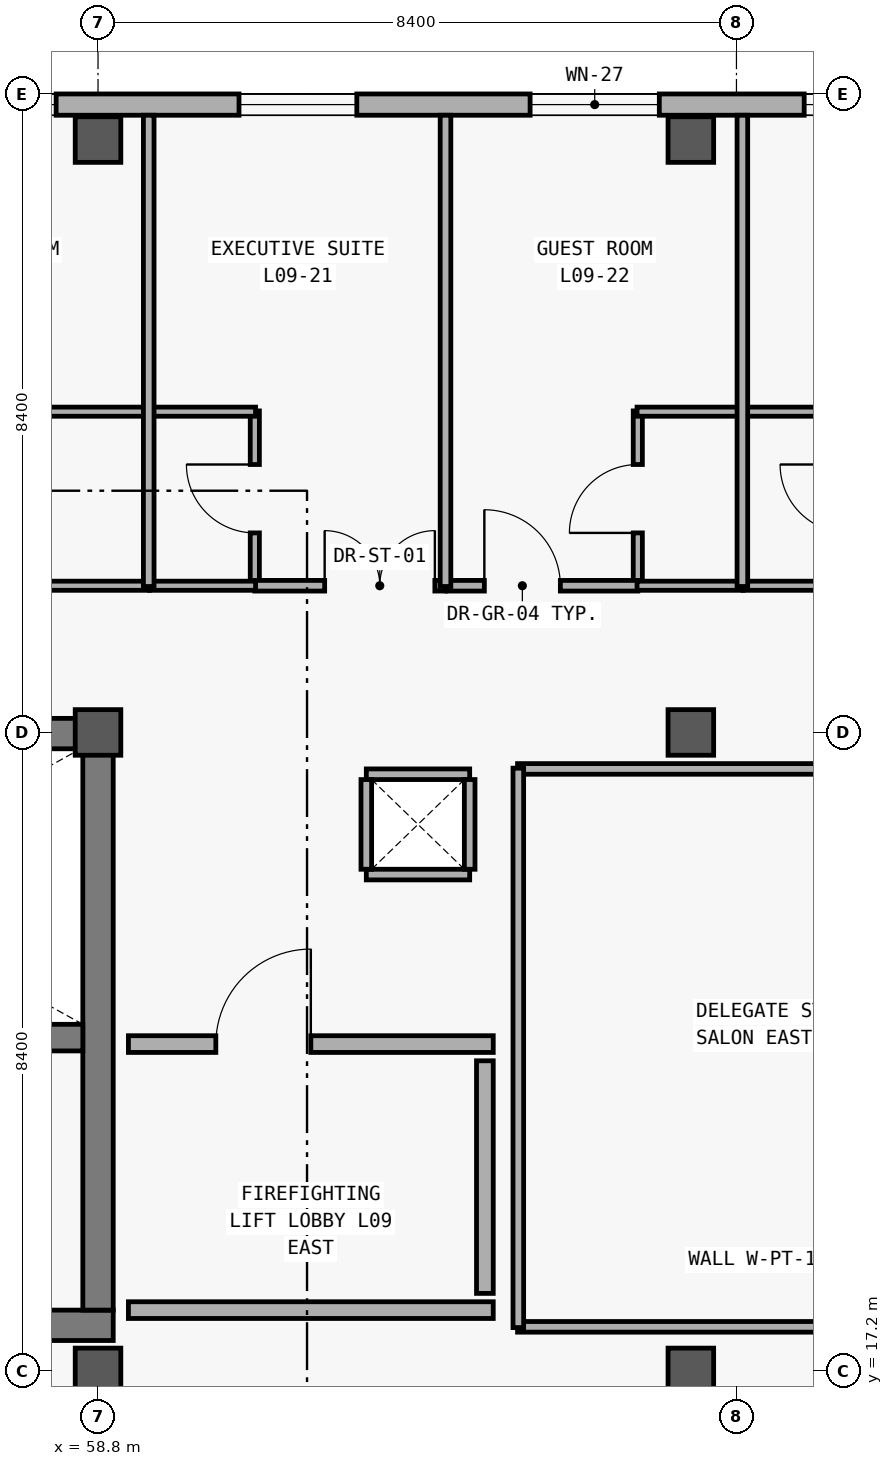
"""IFC4 building model, lengths in metres.
Left out: names, types, materials, properties, quantities, classifications, styles, units other than length and angle.
Written with IfcOpenShell. Run it as: python <this file> out.ifc"""

import sys

from ifc_helpers import new_model, si_unit, direction, frame, frame_2d, origin, origin_2d, place, context, subcontext, project, spatial, rectangle, extrude, element, fill, save


model = new_model("IFC4")
c1 = context("Model", 3, precision=1e-05, world=origin(), true_north=direction((0.0, 1.0)))
c2 = subcontext(c1, "Body", "Model", "MODEL_VIEW")
j1 = project(units=[si_unit("LENGTHUNIT", "METRE"), si_unit("PLANEANGLEUNIT", "RADIAN")], contexts=[c1])
p1 = place(None, origin())
s1 = spatial("IfcSite", under=j1, at=p1, CompositionType="ELEMENT")
p2 = place(p1, origin())
s2 = spatial("IfcBuilding", under=s1, at=p2, CompositionType="ELEMENT")
p3 = place(p2, frame((0.0, 0.0, 37.2)))
s3 = spatial("IfcBuildingStorey", under=s2, at=p3, CompositionType="ELEMENT", Elevation=37.2)
for number, where, z_axis, x_axis in (
    (1, (58.8, 17.2, 0.0), (0.0, 0.0, 1.0), (1.0, 0.0, 0.0)),
    (2, (58.8, 25.6, 0.0), (0.0, 0.0, 1.0), (1.0, 0.0, 0.0)),
    (3, (58.8, 33.4, 0.0), (0.0, 0.0, 1.0), (1.0, 0.0, 0.0)),
    (4, (66.6, 17.2, 0.0), (0.0, 0.0, 1.0), (1.0, 0.0, 0.0)),
    (5, (66.6, 25.6, 0.0), (0.0, 0.0, 1.0), (1.0, 0.0, 0.0)),
    (6, (66.6, 33.4, 0.0), (0.0, 0.0, 1.0), (1.0, 0.0, 0.0)),
):
    element("IfcColumn", number, at=place(p3, frame(where, z_axis=z_axis, x_axis=x_axis)), inside=s3, PredefinedType="COLUMN", context=c2, shape_type="SweptSolid", body=[
        extrude(rectangle(XDim=0.6, YDim=0.6, at=origin_2d()), origin(), (0.0, 0.0, 1.0), 3.6),
    ])
p4 = place(p3, frame((17.08, 33.86, 0.0), z_axis=(0.0, 0.0, 1.0), x_axis=(1.0, 0.0, 0.0)))
e7 = element("IfcWall", 7, at=p4, inside=s3, PredefinedType="SOLIDWALL", context=c2, shape_type="SweptSolid", body=[
    extrude(rectangle(XDim=58.24, YDim=0.28, at=frame_2d((29.12, 0.0))), origin(), (0.0, 0.0, 1.0), 3.34),
])
p5 = place(p4, frame((4.87, 0.0, 0.85)))
e8 = element("IfcOpeningElement", 8, at=p5, cuts=e7, PredefinedType="OPENING", context=c2, shape_type="SweptSolid", body=[
    extrude(rectangle(XDim=1.55, YDim=1.65, at=frame_2d((0.775, 0.825))), frame((0.0, 0.15, 0.0), z_axis=(0.0, -1.0, 0.0), x_axis=(1.0, 0.0, 0.0)), (0.0, 0.0, 1.0), 0.3),
])
p6 = place(p4, frame((12.303, 0.0, 0.85)))
e9 = element("IfcOpeningElement", 9, at=p6, cuts=e7, PredefinedType="OPENING", context=c2, shape_type="SweptSolid", body=[
    extrude(rectangle(XDim=1.6, YDim=1.6, at=frame_2d((0.8, 0.8))), frame((0.0, 0.15, 0.0), z_axis=(0.0, -1.0, 0.0), x_axis=(1.0, 0.0, 0.0)), (0.0, 0.0, 1.0), 0.3),
])
p7 = place(p4, frame((16.109, 0.0, 0.85)))
e10 = element("IfcOpeningElement", 10, at=p7, cuts=e7, PredefinedType="OPENING", context=c2, shape_type="SweptSolid", body=[
    extrude(rectangle(XDim=1.8, YDim=1.6, at=frame_2d((0.9, 0.8))), frame((0.0, 0.15, 0.0), z_axis=(0.0, -1.0, 0.0), x_axis=(1.0, 0.0, 0.0)), (0.0, 0.0, 1.0), 0.3),
])
p8 = place(p4, frame((19.915, 0.0, 0.85)))
e11 = element("IfcOpeningElement", 11, at=p8, cuts=e7, PredefinedType="OPENING", context=c2, shape_type="SweptSolid", body=[
    extrude(rectangle(XDim=2.0, YDim=1.65, at=frame_2d((1.0, 0.825))), frame((0.0, 0.15, 0.0), z_axis=(0.0, -1.0, 0.0), x_axis=(1.0, 0.0, 0.0)), (0.0, 0.0, 1.0), 0.3),
])
p9 = place(p4, frame((23.72, 0.0, 0.85)))
e12 = element("IfcOpeningElement", 12, at=p9, cuts=e7, PredefinedType="OPENING", context=c2, shape_type="SweptSolid", body=[
    extrude(rectangle(XDim=2.2, YDim=1.65, at=frame_2d((1.1, 0.825))), frame((0.0, 0.15, 0.0), z_axis=(0.0, -1.0, 0.0), x_axis=(1.0, 0.0, 0.0)), (0.0, 0.0, 1.0), 0.3),
])
p10 = place(p4, frame((27.426, 0.0, 0.85)))
e13 = element("IfcOpeningElement", 13, at=p10, cuts=e7, PredefinedType="OPENING", context=c2, shape_type="SweptSolid", body=[
    extrude(rectangle(XDim=2.6, YDim=2.2, at=frame_2d((1.3, 1.1))), frame((0.0, 0.15, 0.0), z_axis=(0.0, -1.0, 0.0), x_axis=(1.0, 0.0, 0.0)), (0.0, 0.0, 1.0), 0.3),
])
p11 = place(p4, frame((32.007, 0.0, 0.85)))
e14 = element("IfcOpeningElement", 14, at=p11, cuts=e7, PredefinedType="OPENING", context=c2, shape_type="SweptSolid", body=[
    extrude(rectangle(XDim=1.25, YDim=1.45, at=frame_2d((0.625, 0.725))), frame((0.0, 0.15, 0.0), z_axis=(0.0, -1.0, 0.0), x_axis=(1.0, 0.0, 0.0)), (0.0, 0.0, 1.0), 0.3),
])
p12 = place(p4, frame((35.863, 0.0, 0.85)))
e15 = element("IfcOpeningElement", 15, at=p12, cuts=e7, PredefinedType="OPENING", context=c2, shape_type="SweptSolid", body=[
    extrude(rectangle(XDim=1.35, YDim=1.55, at=frame_2d((0.675, 0.775))), frame((0.0, 0.15, 0.0), z_axis=(0.0, -1.0, 0.0), x_axis=(1.0, 0.0, 0.0)), (0.0, 0.0, 1.0), 0.3),
])
p13 = place(p4, frame((39.719, 0.0, 0.85)))
e16 = element("IfcOpeningElement", 16, at=p13, cuts=e7, PredefinedType="OPENING", context=c2, shape_type="SweptSolid", body=[
    extrude(rectangle(XDim=1.45, YDim=1.65, at=frame_2d((0.725, 0.825))), frame((0.0, 0.15, 0.0), z_axis=(0.0, -1.0, 0.0), x_axis=(1.0, 0.0, 0.0)), (0.0, 0.0, 1.0), 0.3),
])
p14 = place(p4, frame((43.575, 0.0, 0.85)))
e17 = element("IfcOpeningElement", 17, at=p14, cuts=e7, PredefinedType="OPENING", context=c2, shape_type="SweptSolid", body=[
    extrude(rectangle(XDim=1.55, YDim=1.65, at=frame_2d((0.775, 0.825))), frame((0.0, 0.15, 0.0), z_axis=(0.0, -1.0, 0.0), x_axis=(1.0, 0.0, 0.0)), (0.0, 0.0, 1.0), 0.3),
])
p15 = place(p4, frame((47.405, 0.0, 0.85)))
e18 = element("IfcOpeningElement", 18, at=p15, cuts=e7, PredefinedType="OPENING", context=c2, shape_type="SweptSolid", body=[
    extrude(rectangle(XDim=1.7, YDim=2.0, at=frame_2d((0.85, 1.0))), frame((0.0, 0.15, 0.0), z_axis=(0.0, -1.0, 0.0), x_axis=(1.0, 0.0, 0.0)), (0.0, 0.0, 1.0), 0.3),
])
p16 = place(p4, frame((51.011, 0.0, 0.85)))
e19 = element("IfcOpeningElement", 19, at=p16, cuts=e7, PredefinedType="OPENING", context=c2, shape_type="SweptSolid", body=[
    extrude(rectangle(XDim=2.3, YDim=2.05, at=frame_2d((1.15, 1.025))), frame((0.0, 0.15, 0.0), z_axis=(0.0, -1.0, 0.0), x_axis=(1.0, 0.0, 0.0)), (0.0, 0.0, 1.0), 0.3),
])
p17 = place(p4, frame((54.692, 0.0, 0.85)))
e20 = element("IfcOpeningElement", 20, at=p17, cuts=e7, PredefinedType="OPENING", context=c2, shape_type="SweptSolid", body=[
    extrude(rectangle(XDim=2.75, YDim=2.1, at=frame_2d((1.375, 1.05))), frame((0.0, 0.15, 0.0), z_axis=(0.0, -1.0, 0.0), x_axis=(1.0, 0.0, 0.0)), (0.0, 0.0, 1.0), 0.3),
])
p18 = place(p3, frame((49.8, 17.8, 0.0), z_axis=(0.0, 0.0, 1.0), x_axis=(1.0, 0.0, 0.0)))
e21 = element("IfcWall", 21, at=p18, inside=s3, PredefinedType="SHEAR", context=c2, shape_type="SweptSolid", body=[
    extrude(rectangle(XDim=9.2, YDim=0.4, at=frame_2d((4.6, 0.0))), origin(), (0.0, 0.0, 1.0), 3.32),
])
p19 = place(p18, frame((1.1, 0.0, 0.0)))
e22 = element("IfcOpeningElement", 22, at=p19, cuts=e21, PredefinedType="OPENING", context=c2, shape_type="SweptSolid", body=[
    extrude(rectangle(XDim=1.2, YDim=2.2, at=frame_2d((0.6, 1.1))), frame((0.0, 0.21, 0.0), z_axis=(0.0, -1.0, 0.0), x_axis=(1.0, 0.0, 0.0)), (0.0, 0.0, 1.0), 0.42),
])
p20 = place(p18, frame((3.5, 0.0, 0.0)))
e23 = element("IfcOpeningElement", 23, at=p20, cuts=e21, PredefinedType="OPENING", context=c2, shape_type="SweptSolid", body=[
    extrude(rectangle(XDim=1.1, YDim=2.2, at=frame_2d((0.55, 1.1))), frame((0.0, 0.21, 0.0), z_axis=(0.0, -1.0, 0.0), x_axis=(1.0, 0.0, 0.0)), (0.0, 0.0, 1.0), 0.42),
])
p21 = place(p18, frame((5.9, 0.0, 0.0)))
e24 = element("IfcOpeningElement", 24, at=p21, cuts=e21, PredefinedType="OPENING", context=c2, shape_type="SweptSolid", body=[
    extrude(rectangle(XDim=1.3, YDim=2.3, at=frame_2d((0.65, 1.15))), frame((0.0, 0.21, 0.0), z_axis=(0.0, -1.0, 0.0), x_axis=(1.0, 0.0, 0.0)), (0.0, 0.0, 1.0), 0.42),
])
p22 = place(p3, frame((59.0, 25.585, 0.0), z_axis=(0.0, 0.0, 1.0), x_axis=(-1.0, 0.0, 0.0)))
e25 = element("IfcWall", 25, at=p22, inside=s3, PredefinedType="SHEAR", context=c2, shape_type="SweptSolid", body=[
    extrude(rectangle(XDim=9.2, YDim=0.4, at=frame_2d((4.6, 0.0))), origin(), (0.0, 0.0, 1.0), 3.32),
])
p23 = place(p3, frame((58.8, 18.0, 0.0), z_axis=(0.0, 0.0, 1.0), x_axis=(0.0, 1.0, 0.0)))
e26 = element("IfcWall", 26, at=p23, inside=s3, PredefinedType="SHEAR", context=c2, shape_type="SweptSolid", body=[
    extrude(rectangle(XDim=7.4, YDim=0.4, at=frame_2d((3.7, 0.0))), origin(), (0.0, 0.0, 1.0), 3.32),
])
p24 = place(p3, frame((50.2, 21.585, 0.0), z_axis=(0.0, 0.0, 1.0), x_axis=(1.0, 0.0, 0.0)))
e27 = element("IfcWall", 27, at=p24, inside=s3, PredefinedType="SHEAR", context=c2, shape_type="SweptSolid", body=[
    extrude(rectangle(XDim=8.4, YDim=0.35, at=frame_2d((4.2, 0.0))), origin(), (0.0, 0.0, 1.0), 3.32),
])
p25 = place(p3, frame((59.2, 18.0, 0.0), z_axis=(0.0, 0.0, 1.0), x_axis=(1.0, 0.0, 0.0)))
e28 = element("IfcWall", 28, at=p25, inside=s3, PredefinedType="SOLIDWALL", context=c2, shape_type="SweptSolid", body=[
    extrude(rectangle(XDim=4.8, YDim=0.22, at=frame_2d((2.4, 0.0))), origin(), (0.0, 0.0, 1.0), 2.47),
])
p26 = place(p3, frame((59.2, 21.5, 0.0), z_axis=(0.0, 0.0, 1.0), x_axis=(1.0, 0.0, 0.0)))
e29 = element("IfcWall", 29, at=p26, inside=s3, PredefinedType="SOLIDWALL", context=c2, shape_type="SweptSolid", body=[
    extrude(rectangle(XDim=4.8, YDim=0.22, at=frame_2d((2.4, 0.0))), origin(), (0.0, 0.0, 1.0), 2.47),
])
p27 = place(p26, frame((1.15, 0.0, 0.0)))
e30 = element("IfcOpeningElement", 30, at=p27, cuts=e29, PredefinedType="OPENING", context=c2, shape_type="SweptSolid", body=[
    extrude(rectangle(XDim=1.25, YDim=2.2, at=frame_2d((0.625, 1.1))), frame((0.0, 0.12, 0.0), z_axis=(0.0, -1.0, 0.0), x_axis=(1.0, 0.0, 0.0)), (0.0, 0.0, 1.0), 0.24),
])
p28 = place(p3, frame((63.89, 18.22, 0.0), z_axis=(0.0, 0.0, 1.0), x_axis=(0.0, 1.0, 0.0)))
e31 = element("IfcWall", 31, at=p28, inside=s3, PredefinedType="SOLIDWALL", context=c2, shape_type="SweptSolid", body=[
    extrude(rectangle(XDim=3.06, YDim=0.22, at=frame_2d((1.53, 0.0))), origin(), (0.0, 0.0, 1.0), 2.47),
])
p29 = place(p3, frame((60.863, 27.52, 0.0), z_axis=(0.0, 0.0, 1.0), x_axis=(0.0, 1.0, 0.0)))
e32 = element("IfcWall", 32, at=p29, inside=s3, PredefinedType="PARTITIONING", context=c2, shape_type="SweptSolid", body=[
    extrude(rectangle(XDim=2.31, YDim=0.12, at=frame_2d((1.155, 0.0))), origin(), (0.0, 0.0, 1.0), 2.48),
])
p30 = place(p29, frame((0.705, 0.0, 0.0)))
e33 = element("IfcOpeningElement", 33, at=p30, cuts=e32, PredefinedType="OPENING", context=c2, shape_type="SweptSolid", body=[
    extrude(rectangle(XDim=0.9, YDim=2.18, at=frame_2d((0.45, 1.09))), frame((0.0, 0.07, 0.0), z_axis=(0.0, -1.0, 0.0), x_axis=(1.0, 0.0, 0.0)), (0.0, 0.0, 1.0), 0.14),
])
p31 = place(p3, frame((65.902, 27.52, 0.0), z_axis=(0.0, 0.0, 1.0), x_axis=(0.0, 1.0, 0.0)))
e34 = element("IfcWall", 34, at=p31, inside=s3, PredefinedType="PARTITIONING", context=c2, shape_type="SweptSolid", body=[
    extrude(rectangle(XDim=2.31, YDim=0.12, at=frame_2d((1.155, 0.0))), origin(), (0.0, 0.0, 1.0), 2.48),
])
p32 = place(p31, frame((0.705, 0.0, 0.0)))
e35 = element("IfcOpeningElement", 35, at=p32, cuts=e34, PredefinedType="OPENING", context=c2, shape_type="SweptSolid", body=[
    extrude(rectangle(XDim=0.9, YDim=2.18, at=frame_2d((0.45, 1.09))), frame((0.0, 0.07, 0.0), z_axis=(0.0, -1.0, 0.0), x_axis=(1.0, 0.0, 0.0)), (0.0, 0.0, 1.0), 0.14),
])
p33 = place(p3, frame((64.32, 17.78, 0.0), z_axis=(0.0, 0.0, 1.0), x_axis=(1.0, 0.0, 0.0)))
e36 = element("IfcWall", 36, at=p33, inside=s3, PredefinedType="PARTITIONING", context=c2, shape_type="SweptSolid", body=[
    extrude(rectangle(XDim=11.0, YDim=0.14, at=frame_2d((5.5, 0.0))), origin(), (0.0, 0.0, 1.0), 2.48),
])
p34 = place(p33, frame((5.958, 0.0, 0.0)))
e37 = element("IfcOpeningElement", 37, at=p34, cuts=e36, PredefinedType="OPENING", context=c2, shape_type="SweptSolid", body=[
    extrude(rectangle(XDim=1.08, YDim=2.25, at=frame_2d((0.54, 1.125))), frame((0.0, 0.08, 0.0), z_axis=(0.0, -1.0, 0.0), x_axis=(1.0, 0.0, 0.0)), (0.0, 0.0, 1.0), 0.16),
])
p35 = place(p3, frame((60.863, 27.53, 0.0), z_axis=(0.0, 0.0, 1.0), x_axis=(1.0, 0.0, 0.0)))
e38 = element("IfcWall", 38, at=p35, inside=s3, PredefinedType="PARTITIONING", context=c2, shape_type="SweptSolid", body=[
    extrude(rectangle(XDim=2.509, YDim=0.14, at=frame_2d((1.254, 0.0))), origin(), (0.0, 0.0, 1.0), 2.48),
])
p36 = place(p35, frame((0.919, 0.0, 0.0)))
e39 = element("IfcOpeningElement", 39, at=p36, cuts=e38, PredefinedType="OPENING", context=c2, shape_type="SweptSolid", body=[
    extrude(rectangle(XDim=1.45, YDim=2.3, at=frame_2d((0.725, 1.15))), frame((0.0, 0.08, 0.0), z_axis=(0.0, -1.0, 0.0), x_axis=(1.0, 0.0, 0.0)), (0.0, 0.0, 1.0), 0.16),
])
p37 = place(p3, frame((63.392, 27.53, 0.0), z_axis=(0.0, 0.0, 1.0), x_axis=(1.0, 0.0, 0.0)))
e40 = element("IfcWall", 40, at=p37, inside=s3, PredefinedType="PARTITIONING", context=c2, shape_type="SweptSolid", body=[
    extrude(rectangle(XDim=2.51, YDim=0.14, at=frame_2d((1.255, 0.0))), origin(), (0.0, 0.0, 1.0), 2.48),
])
p38 = place(p37, frame((0.491, 0.0, 0.0)))
e41 = element("IfcOpeningElement", 41, at=p38, cuts=e40, PredefinedType="OPENING", context=c2, shape_type="SweptSolid", body=[
    extrude(rectangle(XDim=1.0, YDim=2.28, at=frame_2d((0.5, 1.14))), frame((0.0, 0.08, 0.0), z_axis=(0.0, -1.0, 0.0), x_axis=(1.0, 0.0, 0.0)), (0.0, 0.0, 1.0), 0.16),
])
for number, where, z_axis, x_axis in (
    (42, (58.081, 27.53, 0.0), (0.0, 0.0, 1.0), (1.0, 0.0, 0.0)),
    (43, (58.081, 29.82, 0.0), (0.0, 0.0, 1.0), (1.0, 0.0, 0.0)),
    (44, (59.477, 27.53, 0.0), (0.0, 0.0, 1.0), (1.0, 0.0, 0.0)),
    (45, (59.477, 29.82, 0.0), (0.0, 0.0, 1.0), (1.0, 0.0, 0.0)),
    (46, (65.892, 27.53, 0.0), (0.0, 0.0, 1.0), (1.0, 0.0, 0.0)),
    (47, (65.892, 29.82, 0.0), (0.0, 0.0, 1.0), (1.0, 0.0, 0.0)),
    (48, (67.288, 27.53, 0.0), (0.0, 0.0, 1.0), (1.0, 0.0, 0.0)),
    (49, (67.288, 29.82, 0.0), (0.0, 0.0, 1.0), (1.0, 0.0, 0.0)),
):
    element("IfcWall", number, at=place(p3, frame(where, z_axis=z_axis, x_axis=x_axis)), inside=s3, PredefinedType="PARTITIONING", context=c2, shape_type="SweptSolid", body=[
        extrude(rectangle(XDim=1.396, YDim=0.12, at=frame_2d((0.698, 0.0))), origin(), (0.0, 0.0, 1.0), 2.48),
    ])
p39 = place(p3, frame((64.32, 25.12, 0.0), z_axis=(0.0, 0.0, 1.0), x_axis=(1.0, 0.0, 0.0)))
e50 = element("IfcWall", 50, at=p39, inside=s3, PredefinedType="PARTITIONING", context=c2, shape_type="SweptSolid", body=[
    extrude(rectangle(XDim=11.0, YDim=0.14, at=frame_2d((5.5, 0.0))), origin(), (0.0, 0.0, 1.0), 2.48),
])
p40 = place(p3, frame((64.33, 17.77, 0.0), z_axis=(0.0, 0.0, 1.0), x_axis=(0.0, 1.0, 0.0)))
e51 = element("IfcWall", 51, at=p40, inside=s3, PredefinedType="PARTITIONING", context=c2, shape_type="SweptSolid", body=[
    extrude(rectangle(XDim=7.36, YDim=0.14, at=frame_2d((3.68, 0.0))), origin(), (0.0, 0.0, 1.0), 2.48),
])
for number, where, z_axis, x_axis in (
    (52, (59.467, 27.52, 0.0), (0.0, 0.0, 1.0), (0.0, 1.0, 0.0)),
    (53, (63.372, 27.52, 0.0), (0.0, 0.0, 1.0), (0.0, 1.0, 0.0)),
    (54, (67.278, 27.52, 0.0), (0.0, 0.0, 1.0), (0.0, 1.0, 0.0)),
):
    element("IfcWall", number, at=place(p3, frame(where, z_axis=z_axis, x_axis=x_axis)), inside=s3, PredefinedType="PARTITIONING", context=c2, shape_type="SweptSolid", body=[
        extrude(rectangle(XDim=6.2, YDim=0.14, at=frame_2d((3.1, 0.0))), origin(), (0.0, 0.0, 1.0), 2.48),
    ])
for number, where, z_axis, x_axis in (
    (55, (62.33, 23.73, 0.0), (0.0, 0.0, 1.0), (1.0, 0.0, 0.0)),
    (56, (63.69, 25.05, 0.0), (0.0, 0.0, 1.0), (-1.0, 0.0, 0.0)),
):
    element("IfcWall", number, at=place(p3, frame(where, z_axis=z_axis, x_axis=x_axis)), inside=s3, PredefinedType="PARTITIONING", context=c2, shape_type="SweptSolid", body=[
        extrude(rectangle(XDim=1.36, YDim=0.14, at=frame_2d((0.68, 0.0))), origin(), (0.0, 0.0, 1.0), 2.44),
    ])
for number, where, z_axis, x_axis in (
    (57, (62.33, 24.98, 0.0), (0.0, 0.0, 1.0), (0.0, -1.0, 0.0)),
    (58, (63.69, 23.8, 0.0), (0.0, 0.0, 1.0), (0.0, 1.0, 0.0)),
):
    element("IfcWall", number, at=place(p3, frame(where, z_axis=z_axis, x_axis=x_axis)), inside=s3, PredefinedType="PARTITIONING", context=c2, shape_type="SweptSolid", body=[
        extrude(rectangle(XDim=1.18, YDim=0.14, at=frame_2d((0.59, 0.0))), origin(), (0.0, 0.0, 1.0), 2.44),
    ])
p41 = place(p13, origin())
e59 = element("IfcWindow", 59, at=p41, inside=s3, PartitioningType="SINGLE_PANEL", PredefinedType="WINDOW", context=c2, shape_type="SweptSolid", body=[
    extrude(rectangle(XDim=1.45, YDim=1.65, at=frame_2d((0.725, 0.825))), frame((0.0, 0.03, 0.0), z_axis=(0.0, -1.0, 0.0), x_axis=(1.0, 0.0, 0.0)), (0.0, 0.0, 1.0), 0.06),
])
fill(e16, e59)
p42 = place(p14, origin())
e60 = element("IfcWindow", 60, at=p42, inside=s3, PartitioningType="SINGLE_PANEL", PredefinedType="WINDOW", context=c2, shape_type="SweptSolid", body=[
    extrude(rectangle(XDim=1.55, YDim=1.65, at=frame_2d((0.775, 0.825))), frame((0.0, 0.03, 0.0), z_axis=(0.0, -1.0, 0.0), x_axis=(1.0, 0.0, 0.0)), (0.0, 0.0, 1.0), 0.06),
])
fill(e17, e60)
p43 = place(p15, origin())
e61 = element("IfcWindow", 61, at=p43, inside=s3, PartitioningType="SINGLE_PANEL", PredefinedType="WINDOW", context=c2, shape_type="SweptSolid", body=[
    extrude(rectangle(XDim=1.7, YDim=2.0, at=frame_2d((0.85, 1.0))), frame((0.0, 0.03, 0.0), z_axis=(0.0, -1.0, 0.0), x_axis=(1.0, 0.0, 0.0)), (0.0, 0.0, 1.0), 0.06),
])
fill(e18, e61)
p44 = place(p16, origin())
e62 = element("IfcWindow", 62, at=p44, inside=s3, PartitioningType="SINGLE_PANEL", PredefinedType="WINDOW", context=c2, shape_type="SweptSolid", body=[
    extrude(rectangle(XDim=2.3, YDim=2.05, at=frame_2d((1.15, 1.025))), frame((0.0, 0.03, 0.0), z_axis=(0.0, -1.0, 0.0), x_axis=(1.0, 0.0, 0.0)), (0.0, 0.0, 1.0), 0.06),
])
fill(e19, e62)
p45 = place(p27, origin())
e63 = element("IfcDoor", 63, at=p45, inside=s3, OperationType="SINGLE_SWING_RIGHT", PredefinedType="DOOR", context=c2, shape_type="SweptSolid", body=[
    extrude(rectangle(XDim=1.25, YDim=2.2, at=frame_2d((0.625, 1.1))), frame((0.0, 0.025, 0.0), z_axis=(0.0, -1.0, 0.0), x_axis=(1.0, 0.0, 0.0)), (0.0, 0.0, 1.0), 0.05),
])
fill(e30, e63)
p46 = place(p30, origin())
e64 = element("IfcDoor", 64, at=p46, inside=s3, OperationType="SINGLE_SWING_RIGHT", PredefinedType="DOOR", context=c2, shape_type="SweptSolid", body=[
    extrude(rectangle(XDim=0.9, YDim=2.18, at=frame_2d((0.45, 1.09))), frame((0.0, 0.025, 0.0), z_axis=(0.0, -1.0, 0.0), x_axis=(1.0, 0.0, 0.0)), (0.0, 0.0, 1.0), 0.05),
])
fill(e33, e64)
p47 = place(p32, origin())
e65 = element("IfcDoor", 65, at=p47, inside=s3, OperationType="SINGLE_SWING_LEFT", PredefinedType="DOOR", context=c2, shape_type="SweptSolid", body=[
    extrude(rectangle(XDim=0.9, YDim=2.18, at=frame_2d((0.45, 1.09))), frame((0.0, 0.025, 0.0), z_axis=(0.0, -1.0, 0.0), x_axis=(1.0, 0.0, 0.0)), (0.0, 0.0, 1.0), 0.05),
])
fill(e35, e65)
p48 = place(p36, origin())
e66 = element("IfcDoor", 66, at=p48, inside=s3, OperationType="DOUBLE_DOOR_SINGLE_SWING", PredefinedType="DOOR", context=c2, shape_type="SweptSolid", body=[
    extrude(rectangle(XDim=1.45, YDim=2.3, at=frame_2d((0.725, 1.15))), frame((0.0, 0.025, 0.0), z_axis=(0.0, -1.0, 0.0), x_axis=(1.0, 0.0, 0.0)), (0.0, 0.0, 1.0), 0.05),
])
fill(e39, e66)
p49 = place(p38, origin())
e67 = element("IfcDoor", 67, at=p49, inside=s3, OperationType="SINGLE_SWING_LEFT", PredefinedType="DOOR", context=c2, shape_type="SweptSolid", body=[
    extrude(rectangle(XDim=1.0, YDim=2.28, at=frame_2d((0.5, 1.14))), frame((0.0, 0.025, 0.0), z_axis=(0.0, -1.0, 0.0), x_axis=(1.0, 0.0, 0.0)), (0.0, 0.0, 1.0), 0.05),
])
fill(e41, e67)
save(model, sys.argv[1])
